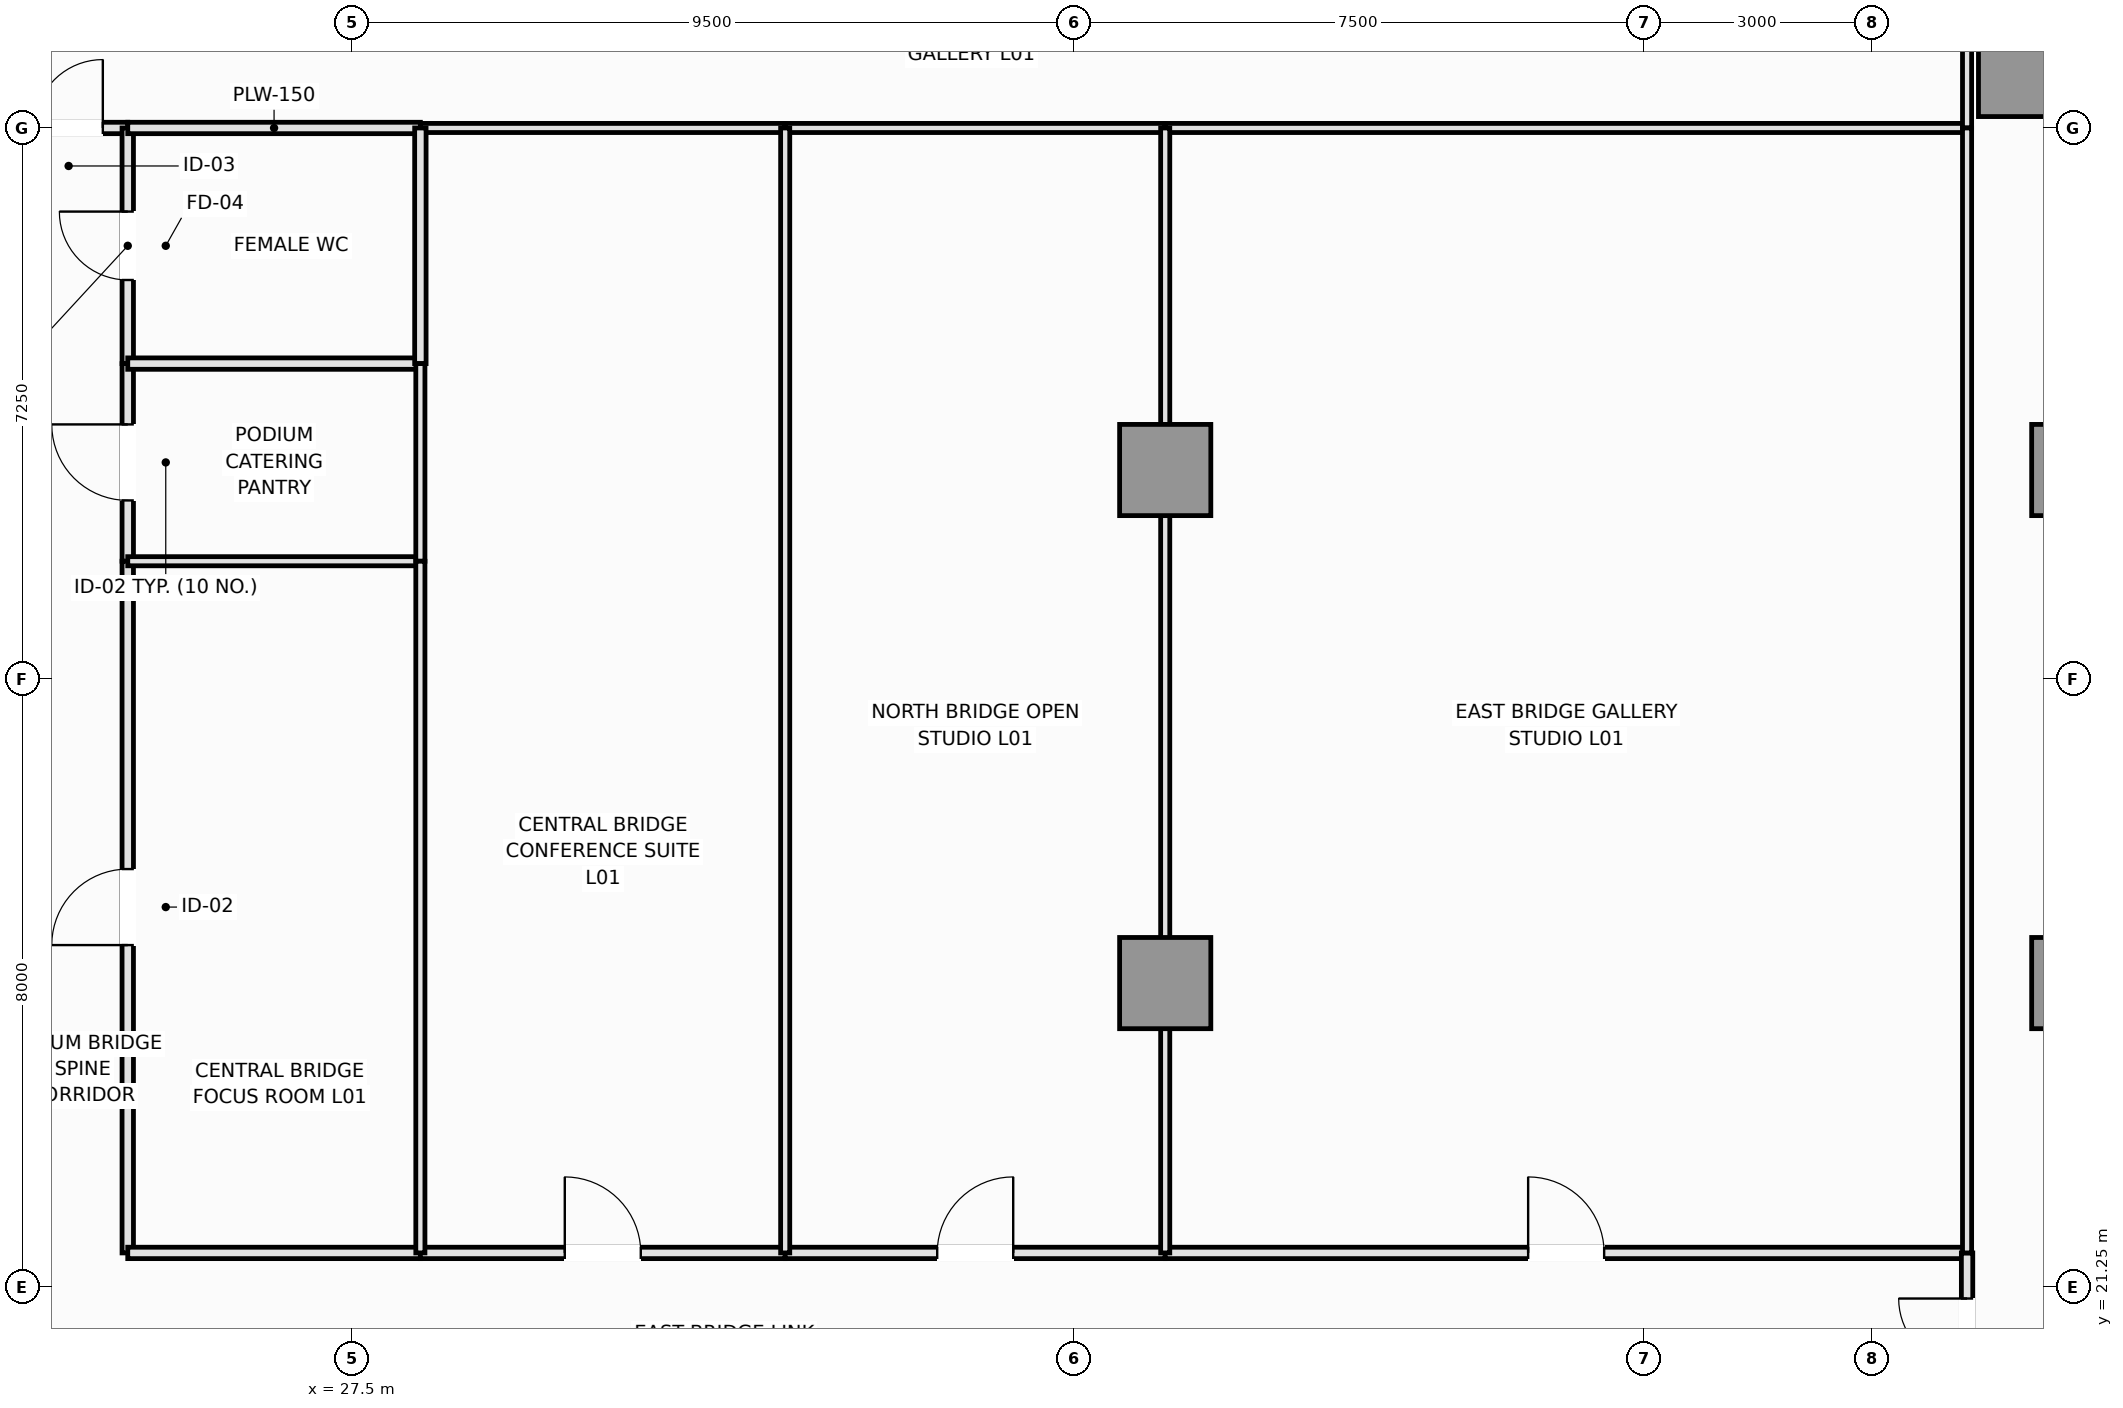
"""IFC4 building model, lengths in metres.
Left out: names, types, materials, properties, quantities, classifications, styles, units other than length and angle.
Written with IfcOpenShell. Run it as: python <this file> out.ifc"""

import sys

from ifc_helpers import new_model, si_unit, direction, frame, frame_2d, origin, origin_2d, place, context, subcontext, project, spatial, rectangle, extrude, element, fill, save


model = new_model("IFC4")
c1 = context("Model", 3, precision=1e-05, world=origin(), true_north=direction((0.0, 1.0)))
c2 = subcontext(c1, "Body", "Model", "MODEL_VIEW")
j1 = project(units=[si_unit("LENGTHUNIT", "METRE"), si_unit("PLANEANGLEUNIT", "RADIAN")], contexts=[c1])
p1 = place(None, origin())
s1 = spatial("IfcSite", under=j1, at=p1, CompositionType="ELEMENT")
p2 = place(p1, origin())
s2 = spatial("IfcBuilding", under=s1, at=p2, CompositionType="ELEMENT")
p3 = place(p2, frame((0.0, 0.0, 6.0)))
s3 = spatial("IfcBuildingStorey", under=s2, at=p3, CompositionType="ELEMENT", Elevation=6.0)
for number, where, z_axis, x_axis in (
    (1, (38.2, 25.25, 0.0), (0.0, 0.0, 1.0), (1.0, 0.0, 0.0)),
    (2, (38.2, 32.0, 0.0), (0.0, 0.0, 1.0), (1.0, 0.0, 0.0)),
):
    element("IfcColumn", number, at=place(p3, frame(where, z_axis=z_axis, x_axis=x_axis)), inside=s3, PredefinedType="COLUMN", context=c2, shape_type="SweptSolid", body=[
        extrude(rectangle(XDim=1.2, YDim=1.2, at=origin_2d()), origin(), (0.0, 0.0, 1.0), 4.8),
    ])
p4 = place(p3, frame((50.2, 37.75, 0.0), z_axis=(0.0, 0.0, 1.0), x_axis=(1.0, 0.0, 0.0)))
e3 = element("IfcColumn", 3, at=p4, inside=s3, PredefinedType="COLUMN", context=c2, shape_type="SweptSolid", body=[
    extrude(rectangle(XDim=2.6, YDim=2.2, at=origin_2d()), origin(), (0.0, 0.0, 1.0), 4.8),
])
for number, where, z_axis, x_axis in (
    (4, (50.2, 25.25, 0.0), (0.0, 0.0, 1.0), (1.0, 0.0, 0.0)),
    (5, (50.2, 32.0, 0.0), (0.0, 0.0, 1.0), (1.0, 0.0, 0.0)),
):
    element("IfcColumn", number, at=place(p3, frame(where, z_axis=z_axis, x_axis=x_axis)), inside=s3, PredefinedType="COLUMN", context=c2, shape_type="SweptSolid", body=[
        extrude(rectangle(XDim=1.2, YDim=1.2, at=origin_2d()), origin(), (0.0, 0.0, 1.0), 4.8),
    ])
p5 = place(p3, frame((22.55, 36.5, 0.0), z_axis=(0.0, 0.0, 1.0), x_axis=(1.0, 0.0, 0.0)))
e6 = element("IfcWall", 6, at=p5, inside=s3, PredefinedType="PARTITIONING", context=c2, shape_type="SweptSolid", body=[
    extrude(rectangle(XDim=2.0, YDim=0.15, at=frame_2d((1.0, 0.0))), origin(), (0.0, 0.0, 1.0), 4.6),
])
p6 = place(p5, frame((0.772, 0.0, 0.0)))
e7 = element("IfcOpeningElement", 7, at=p6, cuts=e6, PredefinedType="OPENING", context=c2, shape_type="SweptSolid", body=[
    extrude(rectangle(XDim=0.9, YDim=2.1, at=frame_2d((0.45, 1.05))), frame((0.0, 0.085, 0.0), z_axis=(0.0, -1.0, 0.0), x_axis=(1.0, 0.0, 0.0)), (0.0, 0.0, 1.0), 0.17),
])
p7 = place(p3, frame((24.55, 33.4, 0.0), z_axis=(0.0, 0.0, 1.0), x_axis=(0.0, 1.0, 0.0)))
e8 = element("IfcWall", 8, at=p7, inside=s3, PredefinedType="PLUMBINGWALL", context=c2, shape_type="SweptSolid", body=[
    extrude(rectangle(XDim=3.1, YDim=0.15, at=frame_2d((1.55, 0.0))), origin(), (0.0, 0.0, 1.0), 4.6),
])
p8 = place(p7, frame((1.1, 0.0, 0.0)))
e9 = element("IfcOpeningElement", 9, at=p8, cuts=e8, PredefinedType="OPENING", context=c2, shape_type="SweptSolid", body=[
    extrude(rectangle(XDim=0.9, YDim=2.1, at=frame_2d((0.45, 1.05))), frame((0.0, 0.085, 0.0), z_axis=(0.0, -1.0, 0.0), x_axis=(1.0, 0.0, 0.0)), (0.0, 0.0, 1.0), 0.17),
])
p9 = place(p3, frame((24.55, 30.8, 0.0), z_axis=(0.0, 0.0, 1.0), x_axis=(0.0, 1.0, 0.0)))
e10 = element("IfcWall", 10, at=p9, inside=s3, PredefinedType="PARTITIONING", context=c2, shape_type="SweptSolid", body=[
    extrude(rectangle(XDim=2.6, YDim=0.15, at=frame_2d((1.3, 0.0))), origin(), (0.0, 0.0, 1.0), 4.6),
])
p10 = place(p9, frame((0.8, 0.0, 0.0)))
e11 = element("IfcOpeningElement", 11, at=p10, cuts=e10, PredefinedType="OPENING", context=c2, shape_type="SweptSolid", body=[
    extrude(rectangle(XDim=1.0, YDim=2.15, at=frame_2d((0.5, 1.075))), frame((0.0, 0.085, 0.0), z_axis=(0.0, -1.0, 0.0), x_axis=(1.0, 0.0, 0.0)), (0.0, 0.0, 1.0), 0.17),
])
p11 = place(p3, frame((24.55, 21.7, 0.0), z_axis=(0.0, 0.0, 1.0), x_axis=(0.0, 1.0, 0.0)))
e12 = element("IfcWall", 12, at=p11, inside=s3, PredefinedType="PARTITIONING", context=c2, shape_type="SweptSolid", body=[
    extrude(rectangle(XDim=9.1, YDim=0.15, at=frame_2d((4.55, 0.0))), origin(), (0.0, 0.0, 1.0), 4.6),
])
p12 = place(p11, frame((4.05, 0.0, 0.0)))
e13 = element("IfcOpeningElement", 13, at=p12, cuts=e12, PredefinedType="OPENING", context=c2, shape_type="SweptSolid", body=[
    extrude(rectangle(XDim=1.0, YDim=2.15, at=frame_2d((0.5, 1.075))), frame((0.0, 0.085, 0.0), z_axis=(0.0, -1.0, 0.0), x_axis=(1.0, 0.0, 0.0)), (0.0, 0.0, 1.0), 0.17),
])
p13 = place(p3, frame((24.55, 21.7, 0.0), z_axis=(0.0, 0.0, 1.0), x_axis=(1.0, 0.0, 0.0)))
e14 = element("IfcWall", 14, at=p13, inside=s3, PredefinedType="PARTITIONING", context=c2, shape_type="SweptSolid", body=[
    extrude(rectangle(XDim=3.85, YDim=0.15, at=frame_2d((1.925, 0.0))), origin(), (0.0, 0.0, 1.0), 4.6),
])
p14 = place(p3, frame((28.4, 21.7, 0.0), z_axis=(0.0, 0.0, 1.0), x_axis=(1.0, 0.0, 0.0)))
e15 = element("IfcWall", 15, at=p14, inside=s3, PredefinedType="PARTITIONING", context=c2, shape_type="SweptSolid", body=[
    extrude(rectangle(XDim=4.8, YDim=0.15, at=frame_2d((2.4, 0.0))), origin(), (0.0, 0.0, 1.0), 4.6),
])
p15 = place(p14, frame((1.9, 0.0, 0.0)))
e16 = element("IfcOpeningElement", 16, at=p15, cuts=e15, PredefinedType="OPENING", context=c2, shape_type="SweptSolid", body=[
    extrude(rectangle(XDim=1.0, YDim=2.15, at=frame_2d((0.5, 1.075))), frame((0.0, 0.085, 0.0), z_axis=(0.0, -1.0, 0.0), x_axis=(1.0, 0.0, 0.0)), (0.0, 0.0, 1.0), 0.17),
])
p16 = place(p3, frame((33.2, 21.7, 0.0), z_axis=(0.0, 0.0, 1.0), x_axis=(1.0, 0.0, 0.0)))
e17 = element("IfcWall", 17, at=p16, inside=s3, PredefinedType="PARTITIONING", context=c2, shape_type="SweptSolid", body=[
    extrude(rectangle(XDim=5.0, YDim=0.15, at=frame_2d((2.5, 0.0))), origin(), (0.0, 0.0, 1.0), 4.6),
])
p17 = place(p16, frame((2.0, 0.0, 0.0)))
e18 = element("IfcOpeningElement", 18, at=p17, cuts=e17, PredefinedType="OPENING", context=c2, shape_type="SweptSolid", body=[
    extrude(rectangle(XDim=1.0, YDim=2.15, at=frame_2d((0.5, 1.075))), frame((0.0, 0.085, 0.0), z_axis=(0.0, -1.0, 0.0), x_axis=(1.0, 0.0, 0.0)), (0.0, 0.0, 1.0), 0.17),
])
p18 = place(p3, frame((38.2, 21.7, 0.0), z_axis=(0.0, 0.0, 1.0), x_axis=(1.0, 0.0, 0.0)))
e19 = element("IfcWall", 19, at=p18, inside=s3, PredefinedType="PARTITIONING", context=c2, shape_type="SweptSolid", body=[
    extrude(rectangle(XDim=10.55, YDim=0.15, at=frame_2d((5.275, 0.0))), origin(), (0.0, 0.0, 1.0), 4.6),
])
p19 = place(p18, frame((4.775, 0.0, 0.0)))
e20 = element("IfcOpeningElement", 20, at=p19, cuts=e19, PredefinedType="OPENING", context=c2, shape_type="SweptSolid", body=[
    extrude(rectangle(XDim=1.0, YDim=2.15, at=frame_2d((0.5, 1.075))), frame((0.0, 0.085, 0.0), z_axis=(0.0, -1.0, 0.0), x_axis=(1.0, 0.0, 0.0)), (0.0, 0.0, 1.0), 0.17),
])
p20 = place(p3, frame((48.75, 19.6, 0.0), z_axis=(0.0, 0.0, 1.0), x_axis=(0.0, 1.0, 0.0)))
e21 = element("IfcWall", 21, at=p20, inside=s3, PredefinedType="PARTITIONING", context=c2, shape_type="SweptSolid", body=[
    extrude(rectangle(XDim=2.1, YDim=0.15, at=frame_2d((1.05, 0.0))), origin(), (0.0, 0.0, 1.0), 4.6),
])
p21 = place(p20, frame((0.6, 0.0, 0.0)))
e22 = element("IfcOpeningElement", 22, at=p21, cuts=e21, PredefinedType="OPENING", context=c2, shape_type="SweptSolid", body=[
    extrude(rectangle(XDim=0.9, YDim=2.1, at=frame_2d((0.45, 1.05))), frame((0.0, 0.085, 0.0), z_axis=(0.0, -1.0, 0.0), x_axis=(1.0, 0.0, 0.0)), (0.0, 0.0, 1.0), 0.17),
])
p22 = place(p3, frame((24.55, 36.5, 0.0), z_axis=(0.0, 0.0, 1.0), x_axis=(1.0, 0.0, 0.0)))
e23 = element("IfcWall", 23, at=p22, inside=s3, PredefinedType="PLUMBINGWALL", context=c2, shape_type="SweptSolid", body=[
    extrude(rectangle(XDim=3.85, YDim=0.15, at=frame_2d((1.925, 0.0))), origin(), (0.0, 0.0, 1.0), 4.6),
])
p23 = place(p3, frame((28.4, 36.5, 0.0), z_axis=(0.0, 0.0, 1.0), x_axis=(1.0, 0.0, 0.0)))
e24 = element("IfcWall", 24, at=p23, inside=s3, PredefinedType="PARTITIONING", context=c2, shape_type="SweptSolid", body=[
    extrude(rectangle(XDim=4.8, YDim=0.12, at=frame_2d((2.4, 0.0))), origin(), (0.0, 0.0, 1.0), 4.6),
])
p24 = place(p3, frame((33.2, 36.5, 0.0), z_axis=(0.0, 0.0, 1.0), x_axis=(1.0, 0.0, 0.0)))
e25 = element("IfcWall", 25, at=p24, inside=s3, PredefinedType="PARTITIONING", context=c2, shape_type="SweptSolid", body=[
    extrude(rectangle(XDim=5.0, YDim=0.12, at=frame_2d((2.5, 0.0))), origin(), (0.0, 0.0, 1.0), 4.6),
])
p25 = place(p3, frame((38.2, 36.5, 0.0), z_axis=(0.0, 0.0, 1.0), x_axis=(1.0, 0.0, 0.0)))
e26 = element("IfcWall", 26, at=p25, inside=s3, PredefinedType="PARTITIONING", context=c2, shape_type="SweptSolid", body=[
    extrude(rectangle(XDim=10.55, YDim=0.12, at=frame_2d((5.275, 0.0))), origin(), (0.0, 0.0, 1.0), 4.6),
])
p26 = place(p3, frame((48.75, 36.5, 0.0), z_axis=(0.0, 0.0, 1.0), x_axis=(0.0, 1.0, 0.0)))
e27 = element("IfcWall", 27, at=p26, inside=s3, PredefinedType="PARTITIONING", context=c2, shape_type="SweptSolid", body=[
    extrude(rectangle(XDim=2.26, YDim=0.12, at=frame_2d((1.13, 0.0))), origin(), (0.0, 0.0, 1.0), 4.6),
])
p27 = place(p3, frame((24.55, 33.4, 0.0), z_axis=(0.0, 0.0, 1.0), x_axis=(1.0, 0.0, 0.0)))
e28 = element("IfcWall", 28, at=p27, inside=s3, PredefinedType="PLUMBINGWALL", context=c2, shape_type="SweptSolid", body=[
    extrude(rectangle(XDim=3.85, YDim=0.15, at=frame_2d((1.925, 0.0))), origin(), (0.0, 0.0, 1.0), 4.6),
])
p28 = place(p3, frame((28.4, 33.4, 0.0), z_axis=(0.0, 0.0, 1.0), x_axis=(0.0, 1.0, 0.0)))
e29 = element("IfcWall", 29, at=p28, inside=s3, PredefinedType="PLUMBINGWALL", context=c2, shape_type="SweptSolid", body=[
    extrude(rectangle(XDim=3.1, YDim=0.15, at=frame_2d((1.55, 0.0))), origin(), (0.0, 0.0, 1.0), 4.6),
])
p29 = place(p3, frame((24.55, 30.8, 0.0), z_axis=(0.0, 0.0, 1.0), x_axis=(1.0, 0.0, 0.0)))
e30 = element("IfcWall", 30, at=p29, inside=s3, PredefinedType="PARTITIONING", context=c2, shape_type="SweptSolid", body=[
    extrude(rectangle(XDim=3.85, YDim=0.12, at=frame_2d((1.925, 0.0))), origin(), (0.0, 0.0, 1.0), 4.6),
])
p30 = place(p3, frame((28.4, 30.8, 0.0), z_axis=(0.0, 0.0, 1.0), x_axis=(0.0, 1.0, 0.0)))
e31 = element("IfcWall", 31, at=p30, inside=s3, PredefinedType="PARTITIONING", context=c2, shape_type="SweptSolid", body=[
    extrude(rectangle(XDim=2.6, YDim=0.12, at=frame_2d((1.3, 0.0))), origin(), (0.0, 0.0, 1.0), 4.6),
])
p31 = place(p3, frame((28.4, 21.7, 0.0), z_axis=(0.0, 0.0, 1.0), x_axis=(0.0, 1.0, 0.0)))
e32 = element("IfcWall", 32, at=p31, inside=s3, PredefinedType="PARTITIONING", context=c2, shape_type="SweptSolid", body=[
    extrude(rectangle(XDim=9.1, YDim=0.12, at=frame_2d((4.55, 0.0))), origin(), (0.0, 0.0, 1.0), 4.6),
])
p32 = place(p3, frame((33.2, 21.7, 0.0), z_axis=(0.0, 0.0, 1.0), x_axis=(0.0, 1.0, 0.0)))
e33 = element("IfcWall", 33, at=p32, inside=s3, PredefinedType="PARTITIONING", context=c2, shape_type="SweptSolid", body=[
    extrude(rectangle(XDim=14.8, YDim=0.12, at=frame_2d((7.4, 0.0))), origin(), (0.0, 0.0, 1.0), 4.6),
])
p33 = place(p3, frame((38.2, 21.7, 0.0), z_axis=(0.0, 0.0, 1.0), x_axis=(0.0, 1.0, 0.0)))
e34 = element("IfcWall", 34, at=p33, inside=s3, PredefinedType="PARTITIONING", context=c2, shape_type="SweptSolid", body=[
    extrude(rectangle(XDim=14.8, YDim=0.12, at=frame_2d((7.4, 0.0))), origin(), (0.0, 0.0, 1.0), 4.0),
])
p34 = place(p3, frame((48.75, 21.7, 0.0), z_axis=(0.0, 0.0, 1.0), x_axis=(0.0, 1.0, 0.0)))
e35 = element("IfcWall", 35, at=p34, inside=s3, PredefinedType="PARTITIONING", context=c2, shape_type="SweptSolid", body=[
    extrude(rectangle(XDim=14.8, YDim=0.12, at=frame_2d((7.4, 0.0))), origin(), (0.0, 0.0, 1.0), 4.6),
])
p35 = place(p6, origin())
e36 = element("IfcDoor", 36, at=p35, inside=s3, OperationType="SINGLE_SWING_RIGHT", PredefinedType="DOOR", context=c2, shape_type="SweptSolid", body=[
    extrude(rectangle(XDim=0.9, YDim=2.1, at=frame_2d((0.45, 1.05))), frame((0.0, 0.025, 0.0), z_axis=(0.0, -1.0, 0.0), x_axis=(1.0, 0.0, 0.0)), (0.0, 0.0, 1.0), 0.05),
])
fill(e7, e36)
p36 = place(p8, origin())
e37 = element("IfcDoor", 37, at=p36, inside=s3, OperationType="SINGLE_SWING_RIGHT", PredefinedType="DOOR", context=c2, shape_type="SweptSolid", body=[
    extrude(rectangle(XDim=0.9, YDim=2.1, at=frame_2d((0.45, 1.05))), frame((0.0, 0.025, 0.0), z_axis=(0.0, -1.0, 0.0), x_axis=(1.0, 0.0, 0.0)), (0.0, 0.0, 1.0), 0.05),
])
fill(e9, e37)
p37 = place(p10, origin())
e38 = element("IfcDoor", 38, at=p37, inside=s3, OperationType="SINGLE_SWING_RIGHT", PredefinedType="DOOR", context=c2, shape_type="SweptSolid", body=[
    extrude(rectangle(XDim=1.0, YDim=2.15, at=frame_2d((0.5, 1.075))), frame((0.0, 0.025, 0.0), z_axis=(0.0, -1.0, 0.0), x_axis=(1.0, 0.0, 0.0)), (0.0, 0.0, 1.0), 0.05),
])
fill(e11, e38)
p38 = place(p12, origin())
e39 = element("IfcDoor", 39, at=p38, inside=s3, OperationType="SINGLE_SWING_LEFT", PredefinedType="DOOR", context=c2, shape_type="SweptSolid", body=[
    extrude(rectangle(XDim=1.0, YDim=2.15, at=frame_2d((0.5, 1.075))), frame((0.0, 0.025, 0.0), z_axis=(0.0, -1.0, 0.0), x_axis=(1.0, 0.0, 0.0)), (0.0, 0.0, 1.0), 0.05),
])
fill(e13, e39)
p39 = place(p15, origin())
e40 = element("IfcDoor", 40, at=p39, inside=s3, OperationType="SINGLE_SWING_LEFT", PredefinedType="DOOR", context=c2, shape_type="SweptSolid", body=[
    extrude(rectangle(XDim=1.0, YDim=2.15, at=frame_2d((0.5, 1.075))), frame((0.0, 0.025, 0.0), z_axis=(0.0, -1.0, 0.0), x_axis=(1.0, 0.0, 0.0)), (0.0, 0.0, 1.0), 0.05),
])
fill(e16, e40)
p40 = place(p17, origin())
e41 = element("IfcDoor", 41, at=p40, inside=s3, OperationType="SINGLE_SWING_RIGHT", PredefinedType="DOOR", context=c2, shape_type="SweptSolid", body=[
    extrude(rectangle(XDim=1.0, YDim=2.15, at=frame_2d((0.5, 1.075))), frame((0.0, 0.025, 0.0), z_axis=(0.0, -1.0, 0.0), x_axis=(1.0, 0.0, 0.0)), (0.0, 0.0, 1.0), 0.05),
])
fill(e18, e41)
p41 = place(p19, origin())
e42 = element("IfcDoor", 42, at=p41, inside=s3, OperationType="SINGLE_SWING_LEFT", PredefinedType="DOOR", context=c2, shape_type="SweptSolid", body=[
    extrude(rectangle(XDim=1.0, YDim=2.15, at=frame_2d((0.5, 1.075))), frame((0.0, 0.025, 0.0), z_axis=(0.0, -1.0, 0.0), x_axis=(1.0, 0.0, 0.0)), (0.0, 0.0, 1.0), 0.05),
])
fill(e20, e42)
p42 = place(p21, origin())
e43 = element("IfcDoor", 43, at=p42, inside=s3, OperationType="SINGLE_SWING_RIGHT", PredefinedType="DOOR", context=c2, shape_type="SweptSolid", body=[
    extrude(rectangle(XDim=0.9, YDim=2.1, at=frame_2d((0.45, 1.05))), frame((0.0, 0.025, 0.0), z_axis=(0.0, -1.0, 0.0), x_axis=(1.0, 0.0, 0.0)), (0.0, 0.0, 1.0), 0.05),
])
fill(e22, e43)
save(model, sys.argv[1])
